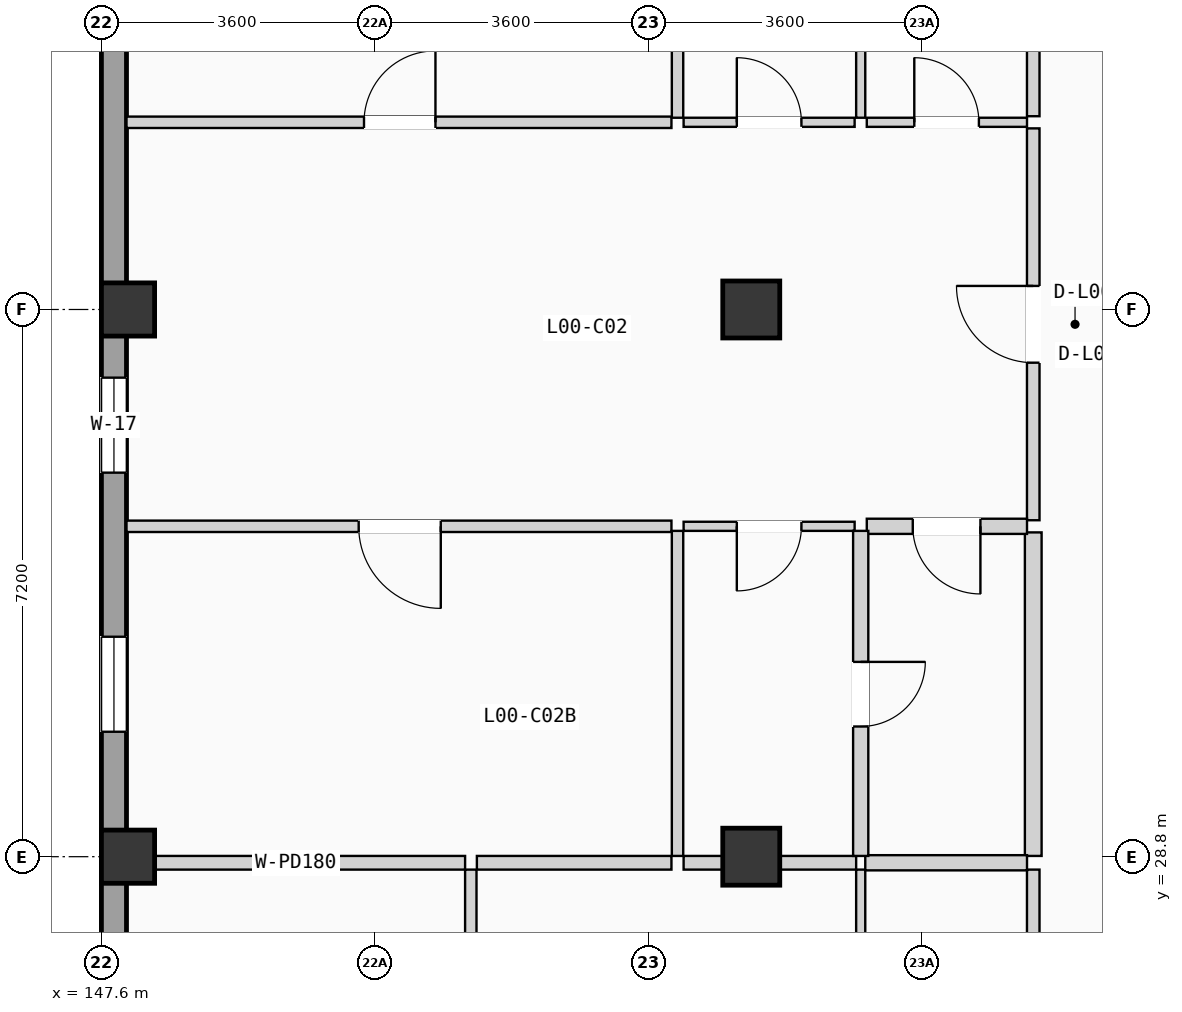
"""IFC4 building model, lengths in metres.
Left out: names, types, materials, properties, quantities, classifications, styles, units other than length and angle.
Written with IfcOpenShell. Run it as: python <this file> out.ifc"""

import sys

from ifc_helpers import new_model, si_unit, direction, frame, frame_2d, origin, origin_2d, place, context, subcontext, project, spatial, rectangle, extrude, element, fill, save


model = new_model("IFC4")
c1 = context("Model", 3, precision=1e-05, world=origin(), true_north=direction((0.0, 1.0)))
c2 = subcontext(c1, "Body", "Model", "MODEL_VIEW")
j1 = project(units=[si_unit("LENGTHUNIT", "METRE"), si_unit("PLANEANGLEUNIT", "RADIAN")], contexts=[c1])
p1 = place(None, origin())
s1 = spatial("IfcSite", under=j1, at=p1, CompositionType="ELEMENT")
p2 = place(p1, origin())
s2 = spatial("IfcBuilding", under=s1, at=p2, CompositionType="ELEMENT")
p3 = place(p2, origin())
s3 = spatial("IfcBuildingStorey", under=s2, at=p3, CompositionType="ELEMENT", Elevation=0.0)
for number, where, z_axis, x_axis in (
    (1, (147.95, 28.8, 0.0), (0.0, 0.0, 1.0), (1.0, 0.0, 0.0)),
    (2, (147.95, 36.0, 0.0), (0.0, 0.0, 1.0), (1.0, 0.0, 0.0)),
):
    element("IfcColumn", number, at=place(p3, frame(where, z_axis=z_axis, x_axis=x_axis)), inside=s3, PredefinedType="COLUMN", context=c2, shape_type="SweptSolid", body=[
        extrude(rectangle(XDim=0.7, YDim=0.7, at=origin_2d()), origin(), (0.0, 0.0, 1.0), 4.9),
    ])
for number, where, z_axis, x_axis in (
    (3, (156.15, 28.8, 0.0), (0.0, 0.0, 1.0), (1.0, 0.0, 0.0)),
    (4, (156.15, 36.0, 0.0), (0.0, 0.0, 1.0), (1.0, 0.0, 0.0)),
):
    element("IfcColumn", number, at=place(p3, frame(where, z_axis=z_axis, x_axis=x_axis)), inside=s3, PredefinedType="COLUMN", context=c2, shape_type="SweptSolid", body=[
        extrude(rectangle(XDim=0.75, YDim=0.75, at=origin_2d()), origin(), (0.0, 0.0, 1.0), 4.9),
    ])
p4 = place(p3, frame((147.765, 0.33, 0.0), z_axis=(0.0, 0.0, 1.0), x_axis=(0.0, 1.0, 0.0)))
e5 = element("IfcWall", 5, at=p4, inside=s3, PredefinedType="SOLIDWALL", context=c2, shape_type="SweptSolid", body=[
    extrude(rectangle(XDim=49.74, YDim=0.33, at=frame_2d((24.87, 0.0))), origin(), (0.0, 0.0, 1.0), 4.64),
])
p5 = place(p4, frame((17.095, 0.0, 0.9)))
e6 = element("IfcOpeningElement", 6, at=p5, cuts=e5, PredefinedType="OPENING", context=c2, shape_type="SweptSolid", body=[
    extrude(rectangle(XDim=1.15, YDim=1.65, at=frame_2d((0.575, 0.825))), frame((0.0, 0.175, 0.0), z_axis=(0.0, -1.0, 0.0), x_axis=(1.0, 0.0, 0.0)), (0.0, 0.0, 1.0), 0.35),
])
p6 = place(p4, frame((9.96, 0.0, 0.9)))
e7 = element("IfcOpeningElement", 7, at=p6, cuts=e5, PredefinedType="OPENING", context=c2, shape_type="SweptSolid", body=[
    extrude(rectangle(XDim=1.15, YDim=1.8, at=frame_2d((0.575, 0.9))), frame((0.0, 0.175, 0.0), z_axis=(0.0, -1.0, 0.0), x_axis=(1.0, 0.0, 0.0)), (0.0, 0.0, 1.0), 0.35),
])
p7 = place(p4, frame((24.245, 0.0, 0.9)))
e8 = element("IfcOpeningElement", 8, at=p7, cuts=e5, PredefinedType="OPENING", context=c2, shape_type="SweptSolid", body=[
    extrude(rectangle(XDim=1.25, YDim=1.2, at=frame_2d((0.625, 0.6))), frame((0.0, 0.175, 0.0), z_axis=(0.0, -1.0, 0.0), x_axis=(1.0, 0.0, 0.0)), (0.0, 0.0, 1.0), 0.35),
])
p8 = place(p4, frame((33.523, 0.0, 0.9)))
e9 = element("IfcOpeningElement", 9, at=p8, cuts=e5, PredefinedType="OPENING", context=c2, shape_type="SweptSolid", body=[
    extrude(rectangle(XDim=1.25, YDim=1.35, at=frame_2d((0.625, 0.675))), frame((0.0, 0.175, 0.0), z_axis=(0.0, -1.0, 0.0), x_axis=(1.0, 0.0, 0.0)), (0.0, 0.0, 1.0), 0.35),
])
p9 = place(p4, frame((30.114, 0.0, 0.9)))
e10 = element("IfcOpeningElement", 10, at=p9, cuts=e5, PredefinedType="OPENING", context=c2, shape_type="SweptSolid", body=[
    extrude(rectangle(XDim=1.25, YDim=1.5, at=frame_2d((0.625, 0.75))), frame((0.0, 0.175, 0.0), z_axis=(0.0, -1.0, 0.0), x_axis=(1.0, 0.0, 0.0)), (0.0, 0.0, 1.0), 0.35),
])
p10 = place(p4, frame((39.716, 0.0, 0.9)))
e11 = element("IfcOpeningElement", 11, at=p10, cuts=e5, PredefinedType="OPENING", context=c2, shape_type="SweptSolid", body=[
    extrude(rectangle(XDim=1.25, YDim=1.65, at=frame_2d((0.625, 0.825))), frame((0.0, 0.175, 0.0), z_axis=(0.0, -1.0, 0.0), x_axis=(1.0, 0.0, 0.0)), (0.0, 0.0, 1.0), 0.35),
])
p11 = place(p3, frame((159.86, 20.73, 0.0), z_axis=(0.0, 0.0, 1.0), x_axis=(0.0, 1.0, 0.0)))
e12 = element("IfcWall", 12, at=p11, inside=s3, PredefinedType="PARTITIONING", context=c2, shape_type="SweptSolid", body=[
    extrude(rectangle(XDim=7.9, YDim=0.165, at=frame_2d((3.95, 0.0))), origin(), (0.0, 0.0, 1.0), 3.84),
])
p12 = place(p3, frame((159.86, 33.227, 0.0), z_axis=(0.0, 0.0, 1.0), x_axis=(0.0, 1.0, 0.0)))
e13 = element("IfcWall", 13, at=p12, inside=s3, PredefinedType="PARTITIONING", context=c2, shape_type="SweptSolid", body=[
    extrude(rectangle(XDim=5.156, YDim=0.165, at=frame_2d((2.578, 0.0))), origin(), (0.0, 0.0, 1.0), 3.84),
])
p13 = place(p12, frame((2.073, 0.0, 0.0)))
e14 = element("IfcOpeningElement", 14, at=p13, cuts=e13, PredefinedType="OPENING", context=c2, shape_type="SweptSolid", body=[
    extrude(rectangle(XDim=1.01, YDim=2.11, at=frame_2d((0.505, 1.055))), frame((0.0, 0.093, 0.0), z_axis=(0.0, -1.0, 0.0), x_axis=(1.0, 0.0, 0.0)), (0.0, 0.0, 1.0), 0.185),
])
p14 = place(p3, frame((159.86, 28.81, 0.0), z_axis=(0.0, 0.0, 1.0), x_axis=(0.0, 1.0, 0.0)))
e15 = element("IfcWall", 15, at=p14, inside=s3, PredefinedType="PLUMBINGWALL", context=c2, shape_type="SweptSolid", body=[
    extrude(rectangle(XDim=4.257, YDim=0.22, at=frame_2d((2.128, 0.0))), origin(), (0.0, 0.0, 1.0), 3.84),
])
p15 = place(p3, frame((159.86, 38.543, 0.0), z_axis=(0.0, 0.0, 1.0), x_axis=(0.0, 1.0, 0.0)))
e16 = element("IfcWall", 16, at=p15, inside=s3, PredefinedType="PARTITIONING", context=c2, shape_type="SweptSolid", body=[
    extrude(rectangle(XDim=4.257, YDim=0.165, at=frame_2d((2.128, 0.0))), origin(), (0.0, 0.0, 1.0), 3.84),
])
p16 = place(p3, frame((157.59, 20.71, 0.0), z_axis=(0.0, 0.0, 1.0), x_axis=(0.0, 1.0, 0.0)))
e17 = element("IfcWall", 17, at=p16, inside=s3, PredefinedType="PARTITIONING", context=c2, shape_type="SweptSolid", body=[
    extrude(rectangle(XDim=7.92, YDim=0.12, at=frame_2d((3.96, 0.0))), origin(), (0.0, 0.0, 1.0), 3.84),
])
p17 = place(p3, frame((157.65, 28.72, 0.0), z_axis=(0.0, 0.0, 1.0), x_axis=(1.0, 0.0, 0.0)))
e18 = element("IfcWall", 18, at=p17, inside=s3, PredefinedType="PLUMBINGWALL", context=c2, shape_type="SweptSolid", body=[
    extrude(rectangle(XDim=2.128, YDim=0.2, at=frame_2d((1.064, 0.0))), origin(), (0.0, 0.0, 1.0), 3.84),
])
p18 = place(p3, frame((152.46, 20.725, 0.0), z_axis=(0.0, 0.0, 1.0), x_axis=(0.0, 1.0, 0.0)))
e19 = element("IfcWall", 19, at=p18, inside=s3, PredefinedType="PARTITIONING", context=c2, shape_type="SweptSolid", body=[
    extrude(rectangle(XDim=7.905, YDim=0.15, at=frame_2d((3.952, 0.0))), origin(), (0.0, 0.0, 1.0), 3.84),
])
p19 = place(p3, frame((147.93, 28.72, 0.0), z_axis=(0.0, 0.0, 1.0), x_axis=(1.0, 0.0, 0.0)))
e20 = element("IfcWall", 20, at=p19, inside=s3, PredefinedType="PARTITIONING", context=c2, shape_type="SweptSolid", body=[
    extrude(rectangle(XDim=4.455, YDim=0.18, at=frame_2d((2.228, 0.0))), origin(), (0.0, 0.0, 1.0), 3.84),
])
p20 = place(p3, frame((152.54, 28.72, 0.0), z_axis=(0.0, 0.0, 1.0), x_axis=(1.0, 0.0, 0.0)))
e21 = element("IfcWall", 21, at=p20, inside=s3, PredefinedType="PARTITIONING", context=c2, shape_type="SweptSolid", body=[
    extrude(rectangle(XDim=2.56, YDim=0.18, at=frame_2d((1.28, 0.0))), origin(), (0.0, 0.0, 1.0), 3.84),
])
p21 = place(p3, frame((155.26, 28.72, 0.0), z_axis=(0.0, 0.0, 1.0), x_axis=(1.0, 0.0, 0.0)))
e22 = element("IfcWall", 22, at=p21, inside=s3, PredefinedType="PARTITIONING", context=c2, shape_type="SweptSolid", body=[
    extrude(rectangle(XDim=2.27, YDim=0.18, at=frame_2d((1.135, 0.0))), origin(), (0.0, 0.0, 1.0), 3.84),
])
p22 = place(p3, frame((157.67, 33.147, 0.0), z_axis=(0.0, 0.0, 1.0), x_axis=(1.0, 0.0, 0.0)))
e23 = element("IfcWall", 23, at=p22, inside=s3, PredefinedType="PLUMBINGWALL", context=c2, shape_type="SweptSolid", body=[
    extrude(rectangle(XDim=2.108, YDim=0.2, at=frame_2d((1.054, 0.0))), origin(), (0.0, 0.0, 1.0), 3.84),
])
p23 = place(p22, frame((0.605, 0.0, 0.0)))
e24 = element("IfcOpeningElement", 24, at=p23, cuts=e23, PredefinedType="OPENING", context=c2, shape_type="SweptSolid", body=[
    extrude(rectangle(XDim=0.89, YDim=2.03, at=frame_2d((0.445, 1.015))), frame((0.0, 0.11, 0.0), z_axis=(0.0, -1.0, 0.0), x_axis=(1.0, 0.0, 0.0)), (0.0, 0.0, 1.0), 0.22),
])
p24 = place(p3, frame((157.67, 38.463, 0.0), z_axis=(0.0, 0.0, 1.0), x_axis=(1.0, 0.0, 0.0)))
e25 = element("IfcWall", 25, at=p24, inside=s3, PredefinedType="PARTITIONING", context=c2, shape_type="SweptSolid", body=[
    extrude(rectangle(XDim=2.108, YDim=0.12, at=frame_2d((1.054, 0.0))), origin(), (0.0, 0.0, 1.0), 3.84),
])
p25 = place(p24, frame((0.625, 0.0, 0.0)))
e26 = element("IfcOpeningElement", 26, at=p25, cuts=e25, PredefinedType="OPENING", context=c2, shape_type="SweptSolid", body=[
    extrude(rectangle(XDim=0.85, YDim=2.01, at=frame_2d((0.425, 1.005))), frame((0.0, 0.07, 0.0), z_axis=(0.0, -1.0, 0.0), x_axis=(1.0, 0.0, 0.0)), (0.0, 0.0, 1.0), 0.14),
])
p26 = place(p3, frame((147.93, 33.147, 0.0), z_axis=(0.0, 0.0, 1.0), x_axis=(1.0, 0.0, 0.0)))
e27 = element("IfcWall", 27, at=p26, inside=s3, PredefinedType="PARTITIONING", context=c2, shape_type="SweptSolid", body=[
    extrude(rectangle(XDim=7.17, YDim=0.15, at=frame_2d((3.585, 0.0))), origin(), (0.0, 0.0, 1.0), 3.84),
])
p27 = place(p26, frame((3.055, 0.0, 0.0)))
e28 = element("IfcOpeningElement", 28, at=p27, cuts=e27, PredefinedType="OPENING", context=c2, shape_type="SweptSolid", body=[
    extrude(rectangle(XDim=1.08, YDim=2.1, at=frame_2d((0.54, 1.05))), frame((0.0, 0.085, 0.0), z_axis=(0.0, -1.0, 0.0), x_axis=(1.0, 0.0, 0.0)), (0.0, 0.0, 1.0), 0.17),
])
p28 = place(p3, frame((155.26, 33.147, 0.0), z_axis=(0.0, 0.0, 1.0), x_axis=(1.0, 0.0, 0.0)))
e29 = element("IfcWall", 29, at=p28, inside=s3, PredefinedType="PARTITIONING", context=c2, shape_type="SweptSolid", body=[
    extrude(rectangle(XDim=2.25, YDim=0.12, at=frame_2d((1.125, 0.0))), origin(), (0.0, 0.0, 1.0), 3.84),
])
p29 = place(p28, frame((0.7, 0.0, 0.0)))
e30 = element("IfcOpeningElement", 30, at=p29, cuts=e29, PredefinedType="OPENING", context=c2, shape_type="SweptSolid", body=[
    extrude(rectangle(XDim=0.85, YDim=2.01, at=frame_2d((0.425, 1.005))), frame((0.0, 0.07, 0.0), z_axis=(0.0, -1.0, 0.0), x_axis=(1.0, 0.0, 0.0)), (0.0, 0.0, 1.0), 0.14),
])
p30 = place(p3, frame((147.93, 38.463, 0.0), z_axis=(0.0, 0.0, 1.0), x_axis=(1.0, 0.0, 0.0)))
e31 = element("IfcWall", 31, at=p30, inside=s3, PredefinedType="PARTITIONING", context=c2, shape_type="SweptSolid", body=[
    extrude(rectangle(XDim=7.17, YDim=0.15, at=frame_2d((3.585, 0.0))), origin(), (0.0, 0.0, 1.0), 3.84),
])
p31 = place(p30, frame((3.125, 0.0, 0.0)))
e32 = element("IfcOpeningElement", 32, at=p31, cuts=e31, PredefinedType="OPENING", context=c2, shape_type="SweptSolid", body=[
    extrude(rectangle(XDim=0.94, YDim=2.06, at=frame_2d((0.47, 1.03))), frame((0.0, 0.085, 0.0), z_axis=(0.0, -1.0, 0.0), x_axis=(1.0, 0.0, 0.0)), (0.0, 0.0, 1.0), 0.17),
])
p32 = place(p3, frame((155.26, 38.463, 0.0), z_axis=(0.0, 0.0, 1.0), x_axis=(1.0, 0.0, 0.0)))
e33 = element("IfcWall", 33, at=p32, inside=s3, PredefinedType="PARTITIONING", context=c2, shape_type="SweptSolid", body=[
    extrude(rectangle(XDim=2.25, YDim=0.12, at=frame_2d((1.125, 0.0))), origin(), (0.0, 0.0, 1.0), 3.84),
])
p33 = place(p32, frame((0.7, 0.0, 0.0)))
e34 = element("IfcOpeningElement", 34, at=p33, cuts=e33, PredefinedType="OPENING", context=c2, shape_type="SweptSolid", body=[
    extrude(rectangle(XDim=0.85, YDim=2.01, at=frame_2d((0.425, 1.005))), frame((0.0, 0.07, 0.0), z_axis=(0.0, -1.0, 0.0), x_axis=(1.0, 0.0, 0.0)), (0.0, 0.0, 1.0), 0.14),
])
p34 = place(p3, frame((157.59, 28.81, 0.0), z_axis=(0.0, 0.0, 1.0), x_axis=(0.0, 1.0, 0.0)))
e35 = element("IfcWall", 35, at=p34, inside=s3, PredefinedType="PLUMBINGWALL", context=c2, shape_type="SweptSolid", body=[
    extrude(rectangle(XDim=4.277, YDim=0.2, at=frame_2d((2.138, 0.0))), origin(), (0.0, 0.0, 1.0), 3.84),
])
p35 = place(p34, frame((1.703, 0.0, 0.0)))
e36 = element("IfcOpeningElement", 36, at=p35, cuts=e35, PredefinedType="OPENING", context=c2, shape_type="SweptSolid", body=[
    extrude(rectangle(XDim=0.85, YDim=2.01, at=frame_2d((0.425, 1.005))), frame((0.0, 0.11, 0.0), z_axis=(0.0, -1.0, 0.0), x_axis=(1.0, 0.0, 0.0)), (0.0, 0.0, 1.0), 0.22),
])
p36 = place(p3, frame((157.59, 38.523, 0.0), z_axis=(0.0, 0.0, 1.0), x_axis=(0.0, 1.0, 0.0)))
e37 = element("IfcWall", 37, at=p36, inside=s3, PredefinedType="PARTITIONING", context=c2, shape_type="SweptSolid", body=[
    extrude(rectangle(XDim=4.277, YDim=0.12, at=frame_2d((2.139, 0.0))), origin(), (0.0, 0.0, 1.0), 3.84),
])
p37 = place(p3, frame((155.18, 28.81, 0.0), z_axis=(0.0, 0.0, 1.0), x_axis=(0.0, 1.0, 0.0)))
e38 = element("IfcWall", 38, at=p37, inside=s3, PredefinedType="PARTITIONING", context=c2, shape_type="SweptSolid", body=[
    extrude(rectangle(XDim=4.277, YDim=0.15, at=frame_2d((2.138, 0.0))), origin(), (0.0, 0.0, 1.0), 3.84),
])
p38 = place(p3, frame((155.18, 38.523, 0.0), z_axis=(0.0, 0.0, 1.0), x_axis=(0.0, 1.0, 0.0)))
e39 = element("IfcWall", 39, at=p38, inside=s3, PredefinedType="PARTITIONING", context=c2, shape_type="SweptSolid", body=[
    extrude(rectangle(XDim=4.277, YDim=0.15, at=frame_2d((2.139, 0.0))), origin(), (0.0, 0.0, 1.0), 3.84),
])
p39 = place(p8, origin())
e40 = element("IfcWindow", 40, at=p39, inside=s3, PartitioningType="SINGLE_PANEL", PredefinedType="WINDOW", context=c2, shape_type="SweptSolid", body=[
    extrude(rectangle(XDim=1.25, YDim=1.35, at=frame_2d((0.625, 0.675))), frame((0.0, 0.03, 0.0), z_axis=(0.0, -1.0, 0.0), x_axis=(1.0, 0.0, 0.0)), (0.0, 0.0, 1.0), 0.06),
])
fill(e9, e40)
p40 = place(p9, origin())
e41 = element("IfcWindow", 41, at=p40, inside=s3, PartitioningType="SINGLE_PANEL", PredefinedType="WINDOW", context=c2, shape_type="SweptSolid", body=[
    extrude(rectangle(XDim=1.25, YDim=1.5, at=frame_2d((0.625, 0.75))), frame((0.0, 0.03, 0.0), z_axis=(0.0, -1.0, 0.0), x_axis=(1.0, 0.0, 0.0)), (0.0, 0.0, 1.0), 0.06),
])
fill(e10, e41)
p41 = place(p13, origin())
e42 = element("IfcDoor", 42, at=p41, inside=s3, OperationType="SINGLE_SWING_RIGHT", PredefinedType="DOOR", context=c2, shape_type="SweptSolid", body=[
    extrude(rectangle(XDim=1.01, YDim=2.11, at=frame_2d((0.505, 1.055))), frame((0.0, 0.025, 0.0), z_axis=(0.0, -1.0, 0.0), x_axis=(1.0, 0.0, 0.0)), (0.0, 0.0, 1.0), 0.05),
])
fill(e14, e42)
p42 = place(p23, frame((0.89, 0.0, 0.0), z_axis=(0.0, 0.0, 1.0), x_axis=(-1.0, 0.0, 0.0)))
e43 = element("IfcDoor", 43, at=p42, inside=s3, OperationType="SINGLE_SWING_RIGHT", PredefinedType="DOOR", context=c2, shape_type="SweptSolid", body=[
    extrude(rectangle(XDim=0.89, YDim=2.03, at=frame_2d((0.445, 1.015))), frame((0.0, 0.025, 0.0), z_axis=(0.0, -1.0, 0.0), x_axis=(1.0, 0.0, 0.0)), (0.0, 0.0, 1.0), 0.05),
])
fill(e24, e43)
p43 = place(p25, origin())
e44 = element("IfcDoor", 44, at=p43, inside=s3, OperationType="SINGLE_SWING_LEFT", PredefinedType="DOOR", context=c2, shape_type="SweptSolid", body=[
    extrude(rectangle(XDim=0.85, YDim=2.01, at=frame_2d((0.425, 1.005))), frame((0.0, 0.025, 0.0), z_axis=(0.0, -1.0, 0.0), x_axis=(1.0, 0.0, 0.0)), (0.0, 0.0, 1.0), 0.05),
])
fill(e26, e44)
p44 = place(p27, frame((1.08, 0.0, 0.0), z_axis=(0.0, 0.0, 1.0), x_axis=(-1.0, 0.0, 0.0)))
e45 = element("IfcDoor", 45, at=p44, inside=s3, OperationType="SINGLE_SWING_RIGHT", PredefinedType="DOOR", context=c2, shape_type="SweptSolid", body=[
    extrude(rectangle(XDim=1.08, YDim=2.1, at=frame_2d((0.54, 1.05))), frame((0.0, 0.025, 0.0), z_axis=(0.0, -1.0, 0.0), x_axis=(1.0, 0.0, 0.0)), (0.0, 0.0, 1.0), 0.05),
])
fill(e28, e45)
p45 = place(p29, frame((0.85, 0.0, 0.0), z_axis=(0.0, 0.0, 1.0), x_axis=(-1.0, 0.0, 0.0)))
e46 = element("IfcDoor", 46, at=p45, inside=s3, OperationType="SINGLE_SWING_LEFT", PredefinedType="DOOR", context=c2, shape_type="SweptSolid", body=[
    extrude(rectangle(XDim=0.85, YDim=2.01, at=frame_2d((0.425, 1.005))), frame((0.0, 0.025, 0.0), z_axis=(0.0, -1.0, 0.0), x_axis=(1.0, 0.0, 0.0)), (0.0, 0.0, 1.0), 0.05),
])
fill(e30, e46)
p46 = place(p31, origin())
e47 = element("IfcDoor", 47, at=p46, inside=s3, OperationType="SINGLE_SWING_RIGHT", PredefinedType="DOOR", context=c2, shape_type="SweptSolid", body=[
    extrude(rectangle(XDim=0.94, YDim=2.06, at=frame_2d((0.47, 1.03))), frame((0.0, 0.025, 0.0), z_axis=(0.0, -1.0, 0.0), x_axis=(1.0, 0.0, 0.0)), (0.0, 0.0, 1.0), 0.05),
])
fill(e32, e47)
p47 = place(p33, origin())
e48 = element("IfcDoor", 48, at=p47, inside=s3, OperationType="SINGLE_SWING_LEFT", PredefinedType="DOOR", context=c2, shape_type="SweptSolid", body=[
    extrude(rectangle(XDim=0.85, YDim=2.01, at=frame_2d((0.425, 1.005))), frame((0.0, 0.025, 0.0), z_axis=(0.0, -1.0, 0.0), x_axis=(1.0, 0.0, 0.0)), (0.0, 0.0, 1.0), 0.05),
])
fill(e34, e48)
p48 = place(p35, frame((0.85, 0.0, 0.0), z_axis=(0.0, 0.0, 1.0), x_axis=(-1.0, 0.0, 0.0)))
e49 = element("IfcDoor", 49, at=p48, inside=s3, OperationType="SINGLE_SWING_RIGHT", PredefinedType="DOOR", context=c2, shape_type="SweptSolid", body=[
    extrude(rectangle(XDim=0.85, YDim=2.01, at=frame_2d((0.425, 1.005))), frame((0.0, 0.025, 0.0), z_axis=(0.0, -1.0, 0.0), x_axis=(1.0, 0.0, 0.0)), (0.0, 0.0, 1.0), 0.05),
])
fill(e36, e49)
save(model, sys.argv[1])
